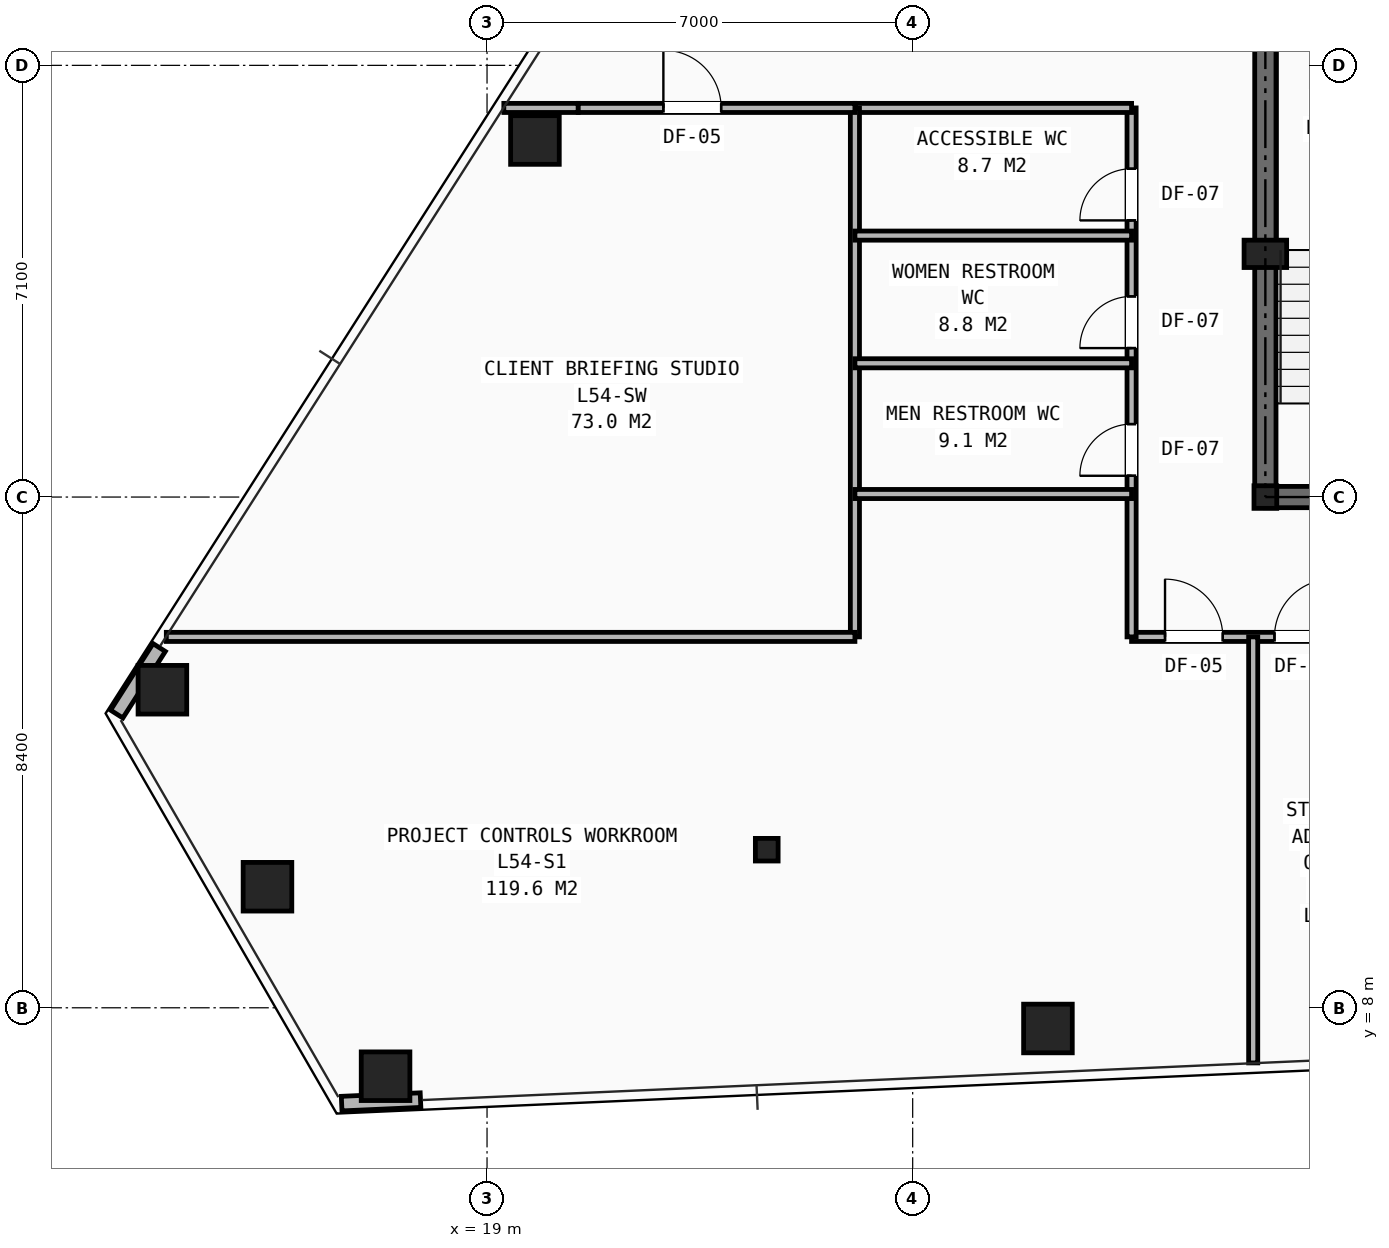
"""IFC4 building model, lengths in metres.
Left out: names, types, materials, properties, quantities, classifications, styles, units other than length and angle.
Written with IfcOpenShell. Run it as: python <this file> out.ifc"""

import sys

from ifc_helpers import new_model, si_unit, direction, frame, frame_2d, origin, origin_2d, place, context, subcontext, project, spatial, rectangle, hollow_rectangle, i_section, extrude, element, fill, save


model = new_model("IFC4")
c1 = context("Model", 3, precision=1e-05, world=origin(), true_north=direction((0.0, 1.0)))
c2 = subcontext(c1, "Body", "Model", "MODEL_VIEW")
j1 = project(units=[si_unit("LENGTHUNIT", "METRE"), si_unit("PLANEANGLEUNIT", "RADIAN")], contexts=[c1])
p1 = place(None, origin())
s1 = spatial("IfcSite", under=j1, at=p1, CompositionType="ELEMENT")
p2 = place(p1, origin())
s2 = spatial("IfcBuilding", under=s1, at=p2, CompositionType="ELEMENT")
p3 = place(p2, frame((0.0, 0.0, 189.6)))
s3 = spatial("IfcBuildingStorey", under=s2, at=p3, CompositionType="ELEMENT", Elevation=189.6)
for number, where, z_axis, x_axis in (
    (1, (31.8, 16.4, 0.0), (0.0, 0.0, 1.0), (1.0, 0.0, 0.0)),
    (2, (23.6, 10.6, 0.0), (0.0, 0.0, 1.0), (1.0, 0.0, 0.0)),
):
    element("IfcColumn", number, at=place(p3, frame(where, z_axis=z_axis, x_axis=x_axis)), inside=s3, PredefinedType="COLUMN", context=c2, shape_type="SweptSolid", body=[
        extrude(i_section(OverallWidth=0.374, OverallDepth=0.372, WebThickness=0.016, FlangeThickness=0.026, at=origin_2d()), origin(), (0.0, 0.0, 1.0), 3.45),
    ])
p4 = place(p3, frame((31.8, 20.4, 0.0), z_axis=(0.0, 0.0, 1.0), x_axis=(1.0, 0.0, 0.0)))
e3 = element("IfcColumn", 3, at=p4, inside=s3, PredefinedType="PILASTER", context=c2, shape_type="SweptSolid", body=[
    extrude(rectangle(XDim=0.7, YDim=0.45, at=origin_2d()), origin(), (0.0, 0.0, 1.0), 3.45),
])
for number, where, z_axis, x_axis in (
    (4, (19.788, 22.272, 0.0), (0.0, 0.0, 1.0), (1.0, 0.0, 0.0)),
    (5, (13.661, 13.231, 0.0), (0.0, 0.0, 1.0), (1.0, 0.0, 0.0)),
    (6, (15.389, 9.991, 0.0), (0.0, 0.0, 1.0), (1.0, 0.0, 0.0)),
    (7, (17.331, 6.875, 0.0), (0.0, 0.0, 1.0), (1.0, 0.0, 0.0)),
    (8, (28.225, 7.659, 0.0), (0.0, 0.0, 1.0), (1.0, 0.0, 0.0)),
):
    element("IfcColumn", number, at=place(p3, frame(where, z_axis=z_axis, x_axis=x_axis)), inside=s3, PredefinedType="COLUMN", context=c2, shape_type="SweptSolid", body=[
        extrude(hollow_rectangle(XDim=0.8, YDim=0.8, WallThickness=0.055, at=origin_2d()), origin(), (0.0, 0.0, 1.0), 3.45),
    ])
for number, where, z_axis, x_axis in (
    (9, (13.608, 13.925, 0.0), (0.0, 0.0, 1.0), (-0.538, -0.843, 0.0)),
    (10, (16.609, 6.424, 0.0), (0.0, 0.0, 1.0), (0.999, 0.044, 0.0)),
):
    element("IfcWall", number, at=place(p3, frame(where, z_axis=z_axis, x_axis=x_axis)), inside=s3, PredefinedType="SHEAR", context=c2, shape_type="SweptSolid", body=[
        extrude(rectangle(XDim=1.298, YDim=0.24, at=frame_2d((0.649, 0.0))), origin(), (0.0, 0.0, 1.0), 2.583),
    ])
p5 = place(p3, frame((31.8, 16.4, 0.0), z_axis=(0.0, 0.0, 1.0), x_axis=(1.0, 0.0, 0.0)))
e11 = element("IfcWall", 11, at=p5, inside=s3, PredefinedType="SHEAR", context=c2, shape_type="SweptSolid", body=[
    extrude(rectangle(XDim=16.4, YDim=0.35, at=frame_2d((8.2, 0.0))), origin(), (0.0, 0.0, 1.0), 3.21),
])
p6 = place(p5, frame((7.75, 0.0, 0.0)))
e12 = element("IfcOpeningElement", 12, at=p6, cuts=e11, PredefinedType="OPENING", context=c2, shape_type="SweptSolid", body=[
    extrude(rectangle(XDim=0.9, YDim=2.1, at=frame_2d((0.45, 1.05))), frame((0.0, 0.185, 0.0), z_axis=(0.0, -1.0, 0.0), x_axis=(1.0, 0.0, 0.0)), (0.0, 0.0, 1.0), 0.37),
])
p7 = place(p5, frame((4.2, 0.0, 0.0)))
e13 = element("IfcOpeningElement", 13, at=p7, cuts=e11, PredefinedType="OPENING", context=c2, shape_type="SweptSolid", body=[
    extrude(rectangle(XDim=0.95, YDim=2.1, at=frame_2d((0.475, 1.05))), frame((0.0, 0.185, 0.0), z_axis=(0.0, -1.0, 0.0), x_axis=(1.0, 0.0, 0.0)), (0.0, 0.0, 1.0), 0.37),
])
p8 = place(p5, frame((10.6, 0.0, 0.0)))
e14 = element("IfcOpeningElement", 14, at=p8, cuts=e11, PredefinedType="OPENING", context=c2, shape_type="SweptSolid", body=[
    extrude(rectangle(XDim=0.95, YDim=2.1, at=frame_2d((0.475, 1.05))), frame((0.0, 0.185, 0.0), z_axis=(0.0, -1.0, 0.0), x_axis=(1.0, 0.0, 0.0)), (0.0, 0.0, 1.0), 0.37),
])
p9 = place(p3, frame((31.8, 16.4, 0.0), z_axis=(0.0, 0.0, 1.0), x_axis=(0.0, 1.0, 0.0)))
e15 = element("IfcWall", 15, at=p9, inside=s3, PredefinedType="SHEAR", context=c2, shape_type="SweptSolid", body=[
    extrude(rectangle(XDim=14.8, YDim=0.35, at=frame_2d((7.4, 0.0))), origin(), (0.0, 0.0, 1.0), 3.21),
])
p10 = place(p9, frame((11.0, 0.0, 0.0)))
e16 = element("IfcOpeningElement", 16, at=p10, cuts=e15, PredefinedType="OPENING", context=c2, shape_type="SweptSolid", body=[
    extrude(rectangle(XDim=1.1, YDim=2.15, at=frame_2d((0.55, 1.075))), frame((0.0, 0.185, 0.0), z_axis=(0.0, -1.0, 0.0), x_axis=(1.0, 0.0, 0.0)), (0.0, 0.0, 1.0), 0.37),
])
p11 = place(p3, frame((29.6, 14.1, 0.0), z_axis=(0.0, 0.0, 1.0), x_axis=(1.0, 0.0, 0.0)))
e17 = element("IfcWall", 17, at=p11, inside=s3, PredefinedType="PARTITIONING", context=c2, shape_type="SweptSolid", body=[
    extrude(rectangle(XDim=18.6, YDim=0.15, at=frame_2d((9.3, 0.0))), origin(), (0.0, 0.0, 1.0), 2.225),
])
p12 = place(p11, frame((0.55, 0.0, 0.0)))
e18 = element("IfcOpeningElement", 18, at=p12, cuts=e17, PredefinedType="OPENING", context=c2, shape_type="SweptSolid", body=[
    extrude(rectangle(XDim=0.95, YDim=2.1, at=frame_2d((0.475, 1.05))), frame((0.0, 0.085, 0.0), z_axis=(0.0, -1.0, 0.0), x_axis=(1.0, 0.0, 0.0)), (0.0, 0.0, 1.0), 0.17),
])
p13 = place(p11, frame((2.35, 0.0, 0.0)))
e19 = element("IfcOpeningElement", 19, at=p13, cuts=e17, PredefinedType="OPENING", context=c2, shape_type="SweptSolid", body=[
    extrude(rectangle(XDim=0.95, YDim=2.1, at=frame_2d((0.475, 1.05))), frame((0.0, 0.085, 0.0), z_axis=(0.0, -1.0, 0.0), x_axis=(1.0, 0.0, 0.0)), (0.0, 0.0, 1.0), 0.17),
])
p14 = place(p11, frame((5.15, 0.0, 0.0)))
e20 = element("IfcOpeningElement", 20, at=p14, cuts=e17, PredefinedType="OPENING", context=c2, shape_type="SweptSolid", body=[
    extrude(rectangle(XDim=0.95, YDim=2.1, at=frame_2d((0.475, 1.05))), frame((0.0, 0.085, 0.0), z_axis=(0.0, -1.0, 0.0), x_axis=(1.0, 0.0, 0.0)), (0.0, 0.0, 1.0), 0.17),
])
p15 = place(p11, frame((7.95, 0.0, 0.0)))
e21 = element("IfcOpeningElement", 21, at=p15, cuts=e17, PredefinedType="OPENING", context=c2, shape_type="SweptSolid", body=[
    extrude(rectangle(XDim=0.95, YDim=2.1, at=frame_2d((0.475, 1.05))), frame((0.0, 0.085, 0.0), z_axis=(0.0, -1.0, 0.0), x_axis=(1.0, 0.0, 0.0)), (0.0, 0.0, 1.0), 0.17),
])
p16 = place(p11, frame((10.75, 0.0, 0.0)))
e22 = element("IfcOpeningElement", 22, at=p16, cuts=e17, PredefinedType="OPENING", context=c2, shape_type="SweptSolid", body=[
    extrude(rectangle(XDim=0.95, YDim=2.1, at=frame_2d((0.475, 1.05))), frame((0.0, 0.085, 0.0), z_axis=(0.0, -1.0, 0.0), x_axis=(1.0, 0.0, 0.0)), (0.0, 0.0, 1.0), 0.17),
])
p17 = place(p11, frame((13.55, 0.0, 0.0)))
e23 = element("IfcOpeningElement", 23, at=p17, cuts=e17, PredefinedType="OPENING", context=c2, shape_type="SweptSolid", body=[
    extrude(rectangle(XDim=0.95, YDim=2.1, at=frame_2d((0.475, 1.05))), frame((0.0, 0.085, 0.0), z_axis=(0.0, -1.0, 0.0), x_axis=(1.0, 0.0, 0.0)), (0.0, 0.0, 1.0), 0.17),
])
p18 = place(p11, frame((16.35, 0.0, 0.0)))
e24 = element("IfcOpeningElement", 24, at=p18, cuts=e17, PredefinedType="OPENING", context=c2, shape_type="SweptSolid", body=[
    extrude(rectangle(XDim=0.95, YDim=2.1, at=frame_2d((0.475, 1.05))), frame((0.0, 0.085, 0.0), z_axis=(0.0, -1.0, 0.0), x_axis=(1.0, 0.0, 0.0)), (0.0, 0.0, 1.0), 0.17),
])
p19 = place(p3, frame((29.6, 14.1, 0.0), z_axis=(0.0, 0.0, 1.0), x_axis=(0.0, 1.0, 0.0)))
e25 = element("IfcWall", 25, at=p19, inside=s3, PredefinedType="PARTITIONING", context=c2, shape_type="SweptSolid", body=[
    extrude(rectangle(XDim=8.7, YDim=0.15, at=frame_2d((4.35, 0.0))), origin(), (0.0, 0.0, 1.0), 3.21),
])
p20 = place(p19, frame((2.65, 0.0, 0.0)))
e26 = element("IfcOpeningElement", 26, at=p20, cuts=e25, PredefinedType="OPENING", context=c2, shape_type="SweptSolid", body=[
    extrude(rectangle(XDim=0.85, YDim=2.05, at=frame_2d((0.425, 1.025))), frame((0.0, 0.085, 0.0), z_axis=(0.0, -1.0, 0.0), x_axis=(1.0, 0.0, 0.0)), (0.0, 0.0, 1.0), 0.17),
])
p21 = place(p19, frame((4.75, 0.0, 0.0)))
e27 = element("IfcOpeningElement", 27, at=p21, cuts=e25, PredefinedType="OPENING", context=c2, shape_type="SweptSolid", body=[
    extrude(rectangle(XDim=0.85, YDim=2.05, at=frame_2d((0.425, 1.025))), frame((0.0, 0.085, 0.0), z_axis=(0.0, -1.0, 0.0), x_axis=(1.0, 0.0, 0.0)), (0.0, 0.0, 1.0), 0.17),
])
p22 = place(p19, frame((6.85, 0.0, 0.0)))
e28 = element("IfcOpeningElement", 28, at=p22, cuts=e25, PredefinedType="OPENING", context=c2, shape_type="SweptSolid", body=[
    extrude(rectangle(XDim=0.85, YDim=2.05, at=frame_2d((0.425, 1.025))), frame((0.0, 0.085, 0.0), z_axis=(0.0, -1.0, 0.0), x_axis=(1.0, 0.0, 0.0)), (0.0, 0.0, 1.0), 0.17),
])
p23 = place(p3, frame((19.276, 22.8, 0.0), z_axis=(0.0, 0.0, 1.0), x_axis=(1.0, 0.0, 0.0)))
e29 = element("IfcWall", 29, at=p23, inside=s3, PredefinedType="PARTITIONING", context=c2, shape_type="SweptSolid", body=[
    extrude(rectangle(XDim=1.224, YDim=0.15, at=frame_2d((0.612, 0.0))), origin(), (0.0, 0.0, 1.0), 2.589),
])
p24 = place(p3, frame((25.05, 22.8, 0.0), z_axis=(0.0, 0.0, 1.0), x_axis=(1.0, 0.0, 0.0)))
e30 = element("IfcWall", 30, at=p24, inside=s3, PredefinedType="PARTITIONING", context=c2, shape_type="SweptSolid", body=[
    extrude(rectangle(XDim=4.55, YDim=0.15, at=frame_2d((2.275, 0.0))), origin(), (0.0, 0.0, 1.0), 3.21),
])
p25 = place(p3, frame((25.05, 14.1, 0.0), z_axis=(0.0, 0.0, 1.0), x_axis=(0.0, 1.0, 0.0)))
e31 = element("IfcWall", 31, at=p25, inside=s3, PredefinedType="PARTITIONING", context=c2, shape_type="SweptSolid", body=[
    extrude(rectangle(XDim=8.7, YDim=0.15, at=frame_2d((4.35, 0.0))), origin(), (0.0, 0.0, 1.0), 3.21),
])
for number, where, z_axis, x_axis in (
    (32, (25.05, 16.45, 0.0), (0.0, 0.0, 1.0), (1.0, 0.0, 0.0)),
    (33, (25.05, 18.6, 0.0), (0.0, 0.0, 1.0), (1.0, 0.0, 0.0)),
    (34, (25.05, 20.7, 0.0), (0.0, 0.0, 1.0), (1.0, 0.0, 0.0)),
):
    element("IfcWall", number, at=place(p3, frame(where, z_axis=z_axis, x_axis=x_axis)), inside=s3, PredefinedType="PARTITIONING", context=c2, shape_type="SweptSolid", body=[
        extrude(rectangle(XDim=4.55, YDim=0.15, at=frame_2d((2.275, 0.0))), origin(), (0.0, 0.0, 1.0), 3.21),
    ])
p26 = place(p3, frame((31.6, 7.093, 0.0), z_axis=(0.0, 0.0, 1.0), x_axis=(0.0, 1.0, 0.0)))
e35 = element("IfcWall", 35, at=p26, inside=s3, PredefinedType="PARTITIONING", context=c2, shape_type="SweptSolid", body=[
    extrude(rectangle(XDim=7.007, YDim=0.15, at=frame_2d((3.503, 0.0))), origin(), (0.0, 0.0, 1.0), 2.589),
])
p27 = place(p3, frame((13.726, 14.1, 0.0), z_axis=(0.0, 0.0, 1.0), x_axis=(1.0, 0.0, 0.0)))
e36 = element("IfcWall", 36, at=p27, inside=s3, PredefinedType="PARTITIONING", context=c2, shape_type="SweptSolid", body=[
    extrude(rectangle(XDim=11.324, YDim=0.15, at=frame_2d((5.662, 0.0))), origin(), (0.0, 0.0, 1.0), 2.589),
])
p28 = place(p3, frame((20.5, 22.8, 0.0), z_axis=(0.0, 0.0, 1.0), x_axis=(1.0, 0.0, 0.0)))
e37 = element("IfcWall", 37, at=p28, inside=s3, PredefinedType="PARTITIONING", context=c2, shape_type="SweptSolid", body=[
    extrude(rectangle(XDim=4.55, YDim=0.15, at=frame_2d((2.275, 0.0))), origin(), (0.0, 0.0, 1.0), 2.589),
])
p29 = place(p28, frame((1.4, 0.0, 0.0)))
e38 = element("IfcOpeningElement", 38, at=p29, cuts=e37, PredefinedType="OPENING", context=c2, shape_type="SweptSolid", body=[
    extrude(rectangle(XDim=0.95, YDim=2.1, at=frame_2d((0.475, 1.05))), frame((0.0, 0.085, 0.0), z_axis=(0.0, -1.0, 0.0), x_axis=(1.0, 0.0, 0.0)), (0.0, 0.0, 1.0), 0.17),
])
p30 = place(p20, origin())
e39 = element("IfcDoor", 39, at=p30, inside=s3, OperationType="SINGLE_SWING_LEFT", PredefinedType="DOOR", context=c2, shape_type="SweptSolid", body=[
    extrude(rectangle(XDim=0.85, YDim=2.05, at=frame_2d((0.425, 1.025))), frame((0.0, 0.025, 0.0), z_axis=(0.0, -1.0, 0.0), x_axis=(1.0, 0.0, 0.0)), (0.0, 0.0, 1.0), 0.05),
])
fill(e26, e39)
p31 = place(p21, origin())
e40 = element("IfcDoor", 40, at=p31, inside=s3, OperationType="SINGLE_SWING_LEFT", PredefinedType="DOOR", context=c2, shape_type="SweptSolid", body=[
    extrude(rectangle(XDim=0.85, YDim=2.05, at=frame_2d((0.425, 1.025))), frame((0.0, 0.025, 0.0), z_axis=(0.0, -1.0, 0.0), x_axis=(1.0, 0.0, 0.0)), (0.0, 0.0, 1.0), 0.05),
])
fill(e27, e40)
p32 = place(p22, origin())
e41 = element("IfcDoor", 41, at=p32, inside=s3, OperationType="SINGLE_SWING_LEFT", PredefinedType="DOOR", context=c2, shape_type="SweptSolid", body=[
    extrude(rectangle(XDim=0.85, YDim=2.05, at=frame_2d((0.425, 1.025))), frame((0.0, 0.025, 0.0), z_axis=(0.0, -1.0, 0.0), x_axis=(1.0, 0.0, 0.0)), (0.0, 0.0, 1.0), 0.05),
])
fill(e28, e41)
p33 = place(p12, origin())
e42 = element("IfcDoor", 42, at=p33, inside=s3, OperationType="SINGLE_SWING_LEFT", PredefinedType="DOOR", context=c2, shape_type="SweptSolid", body=[
    extrude(rectangle(XDim=0.95, YDim=2.1, at=frame_2d((0.475, 1.05))), frame((0.0, 0.025, 0.0), z_axis=(0.0, -1.0, 0.0), x_axis=(1.0, 0.0, 0.0)), (0.0, 0.0, 1.0), 0.05),
])
fill(e18, e42)
p34 = place(p13, origin())
e43 = element("IfcDoor", 43, at=p34, inside=s3, OperationType="SINGLE_SWING_RIGHT", PredefinedType="DOOR", context=c2, shape_type="SweptSolid", body=[
    extrude(rectangle(XDim=0.95, YDim=2.1, at=frame_2d((0.475, 1.05))), frame((0.0, 0.025, 0.0), z_axis=(0.0, -1.0, 0.0), x_axis=(1.0, 0.0, 0.0)), (0.0, 0.0, 1.0), 0.05),
])
fill(e19, e43)
p35 = place(p29, origin())
e44 = element("IfcDoor", 44, at=p35, inside=s3, OperationType="SINGLE_SWING_LEFT", PredefinedType="DOOR", context=c2, shape_type="SweptSolid", body=[
    extrude(rectangle(XDim=0.95, YDim=2.1, at=frame_2d((0.475, 1.05))), frame((0.0, 0.025, 0.0), z_axis=(0.0, -1.0, 0.0), x_axis=(1.0, 0.0, 0.0)), (0.0, 0.0, 1.0), 0.05),
])
fill(e38, e44)
save(model, sys.argv[1])
